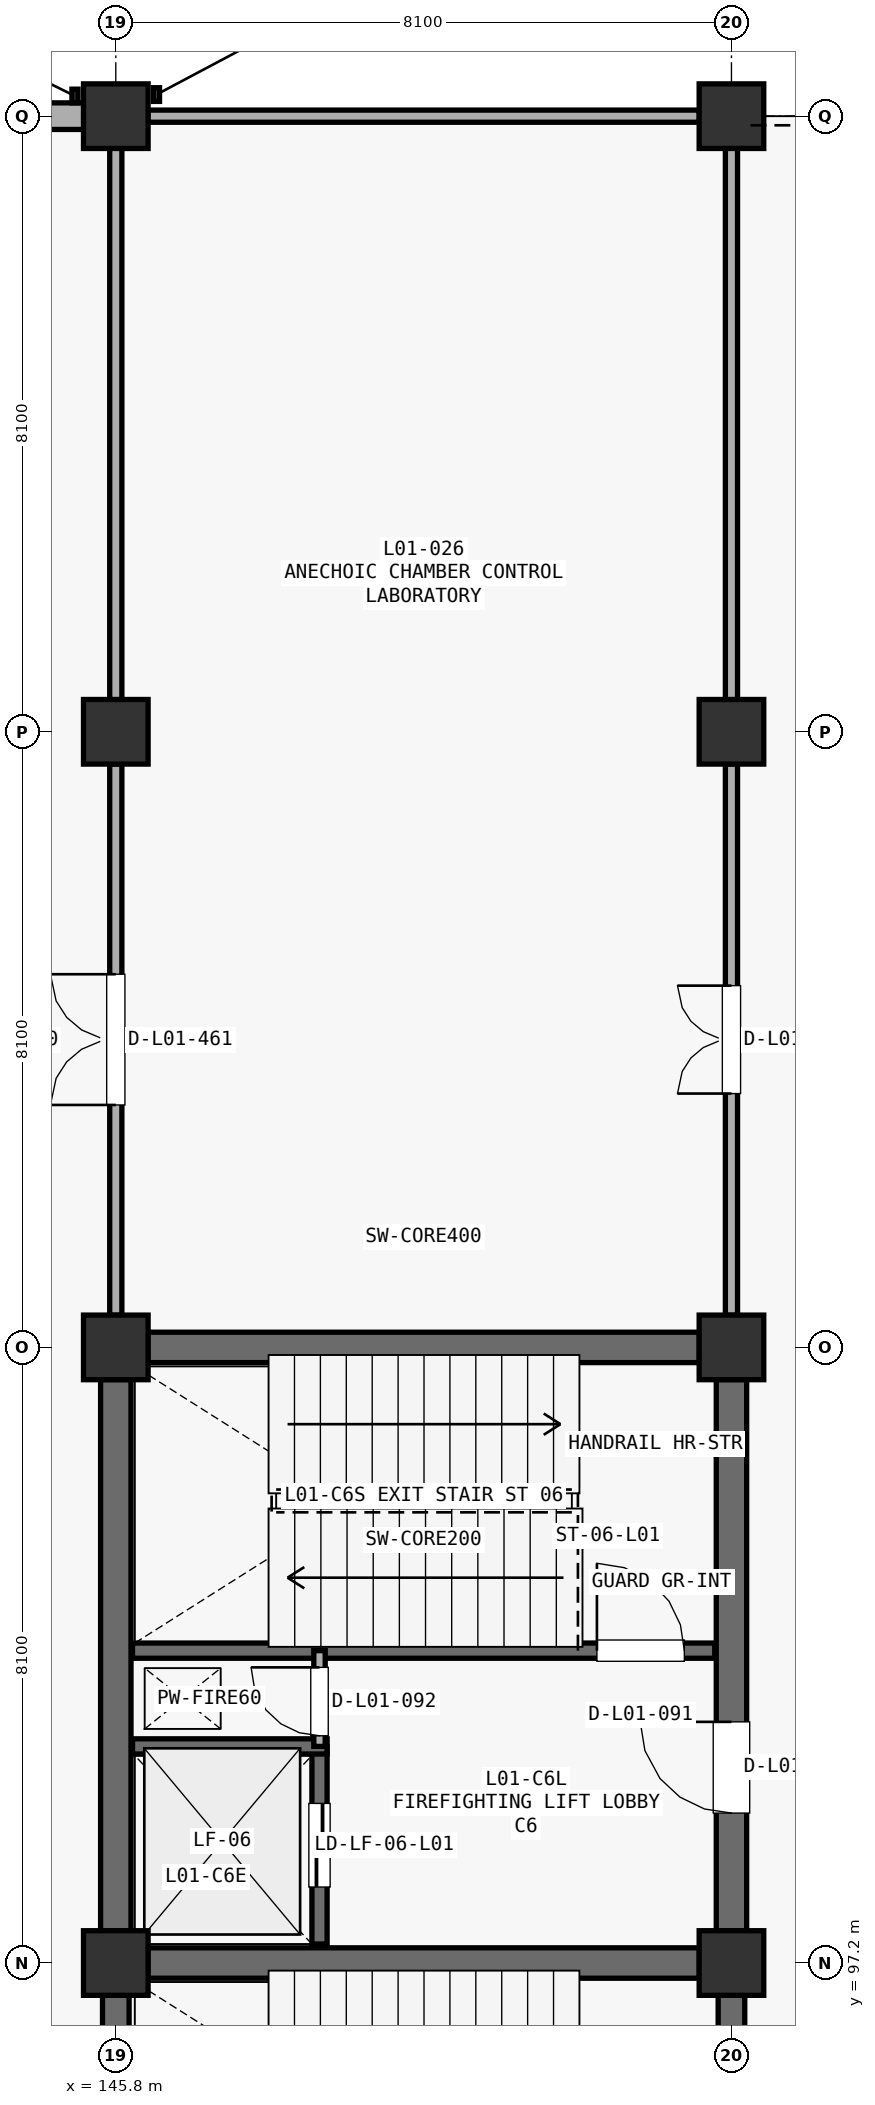
"""IFC4 building model, lengths in metres.
Left out: names, types, materials, properties, quantities, classifications, styles, units other than length and angle.
Written with IfcOpenShell. Run it as: python <this file> out.ifc"""

import sys

from ifc_helpers import new_model, si_unit, direction, frame, frame_2d, origin, origin_2d, place, context, subcontext, project, spatial, rectangle, extrude, element, fill, save


model = new_model("IFC4")
c1 = context("Model", 3, precision=1e-05, world=origin(), true_north=direction((0.0, 1.0)))
c2 = subcontext(c1, "Body", "Model", "MODEL_VIEW")
j1 = project(units=[si_unit("LENGTHUNIT", "METRE"), si_unit("PLANEANGLEUNIT", "RADIAN")], contexts=[c1])
p1 = place(None, origin())
s1 = spatial("IfcSite", under=j1, at=p1, CompositionType="ELEMENT")
p2 = place(p1, origin())
s2 = spatial("IfcBuilding", under=s1, at=p2, CompositionType="ELEMENT")
p3 = place(p2, frame((0.0, 0.0, 5.1)))
s3 = spatial("IfcBuildingStorey", under=s2, at=p3, CompositionType="ELEMENT", Elevation=5.1)
for number, where, z_axis, x_axis in (
    (1, (145.8, 97.2, 0.0), (0.0, 0.0, 1.0), (1.0, 0.0, 0.0)),
    (2, (145.8, 105.3, 0.0), (0.0, 0.0, 1.0), (1.0, 0.0, 0.0)),
    (3, (145.8, 113.4, 0.0), (0.0, 0.0, 1.0), (1.0, 0.0, 0.0)),
    (4, (145.8, 121.5, 0.0), (0.0, 0.0, 1.0), (1.0, 0.0, 0.0)),
    (5, (153.9, 97.2, 0.0), (0.0, 0.0, 1.0), (1.0, 0.0, 0.0)),
    (6, (153.9, 105.3, 0.0), (0.0, 0.0, 1.0), (1.0, 0.0, 0.0)),
    (7, (153.9, 113.4, 0.0), (0.0, 0.0, 1.0), (1.0, 0.0, 0.0)),
    (8, (153.9, 121.5, 0.0), (0.0, 0.0, 1.0), (1.0, 0.0, 0.0)),
):
    element("IfcColumn", number, at=place(p3, frame(where, z_axis=z_axis, x_axis=x_axis)), inside=s3, PredefinedType="COLUMN", context=c2, shape_type="SweptSolid", body=[
        extrude(rectangle(XDim=0.85, YDim=0.85, at=origin_2d()), origin(), (0.0, 0.0, 1.0), 4.59),
    ])
p4 = place(p3, frame((138.123, 121.5, 0.0), z_axis=(0.0, 0.0, 1.0), x_axis=(1.0, 0.0, 0.0)))
e9 = element("IfcWall", 9, at=p4, inside=s3, PredefinedType="STANDARD", context=c2, shape_type="SweptSolid", body=[
    extrude(rectangle(XDim=7.254, YDim=0.35, at=frame_2d((3.627, 0.0))), origin(), (0.0, 0.0, 1.0), 3.362),
])
p5 = place(p4, frame((2.427, 0.0, 0.85)))
e10 = element("IfcOpeningElement", 10, at=p5, cuts=e9, PredefinedType="OPENING", context=c2, shape_type="SweptSolid", body=[
    extrude(rectangle(XDim=2.4, YDim=1.8, at=frame_2d((1.2, 0.9))), frame((0.0, 0.185, 0.0), z_axis=(0.0, -1.0, 0.0), x_axis=(1.0, 0.0, 0.0)), (0.0, 0.0, 1.0), 0.37),
])
p6 = place(p3, frame((146.223, 105.3, 0.0), z_axis=(0.0, 0.0, 1.0), x_axis=(1.0, 0.0, 0.0)))
e11 = element("IfcWall", 11, at=p6, inside=s3, PredefinedType="SHEAR", context=c2, shape_type="SweptSolid", body=[
    extrude(rectangle(XDim=7.254, YDim=0.4, at=frame_2d((3.627, 0.0))), origin(), (0.0, 0.0, 1.0), 4.312),
])
p7 = place(p3, frame((145.8, 97.623, 0.0), z_axis=(0.0, 0.0, 1.0), x_axis=(0.0, 1.0, 0.0)))
e12 = element("IfcWall", 12, at=p7, inside=s3, PredefinedType="SHEAR", context=c2, shape_type="SweptSolid", body=[
    extrude(rectangle(XDim=7.254, YDim=0.4, at=frame_2d((3.627, 0.0))), origin(), (0.0, 0.0, 1.0), 4.312),
])
p8 = place(p3, frame((153.9, 97.623, 0.0), z_axis=(0.0, 0.0, 1.0), x_axis=(0.0, 1.0, 0.0)))
e13 = element("IfcWall", 13, at=p8, inside=s3, PredefinedType="SHEAR", context=c2, shape_type="SweptSolid", body=[
    extrude(rectangle(XDim=7.254, YDim=0.4, at=frame_2d((3.627, 0.0))), origin(), (0.0, 0.0, 1.0), 4.312),
])
p9 = place(p8, frame((1.55, 0.0, 0.0)))
e14 = element("IfcOpeningElement", 14, at=p9, cuts=e13, PredefinedType="OPENING", context=c2, shape_type="SweptSolid", body=[
    extrude(rectangle(XDim=1.2, YDim=2.2, at=frame_2d((0.6, 1.1))), frame((0.0, 0.21, 0.0), z_axis=(0.0, -1.0, 0.0), x_axis=(1.0, 0.0, 0.0)), (0.0, 0.0, 1.0), 0.42),
])
p10 = place(p3, frame((146.223, 97.2, 0.0), z_axis=(0.0, 0.0, 1.0), x_axis=(1.0, 0.0, 0.0)))
e15 = element("IfcWall", 15, at=p10, inside=s3, PredefinedType="SHEAR", context=c2, shape_type="SweptSolid", body=[
    extrude(rectangle(XDim=7.254, YDim=0.4, at=frame_2d((3.627, 0.0))), origin(), (0.0, 0.0, 1.0), 4.312),
])
p11 = place(p3, frame((146.02, 101.31, 0.0), z_axis=(0.0, 0.0, 1.0), x_axis=(1.0, 0.0, 0.0)))
e16 = element("IfcWall", 16, at=p11, inside=s3, PredefinedType="SHEAR", context=c2, shape_type="SweptSolid", body=[
    extrude(rectangle(XDim=7.66, YDim=0.2, at=frame_2d((3.83, 0.0))), origin(), (0.0, 0.0, 1.0), 4.312),
])
p12 = place(p11, frame((6.11, 0.0, 0.0)))
e17 = element("IfcOpeningElement", 17, at=p12, cuts=e16, PredefinedType="OPENING", context=c2, shape_type="SweptSolid", body=[
    extrude(rectangle(XDim=1.15, YDim=2.2, at=frame_2d((0.575, 1.1))), frame((0.0, 0.11, 0.0), z_axis=(0.0, -1.0, 0.0), x_axis=(1.0, 0.0, 0.0)), (0.0, 0.0, 1.0), 0.22),
])
p13 = place(p3, frame((148.48, 97.45, 0.0), z_axis=(0.0, 0.0, 1.0), x_axis=(0.0, 1.0, 0.0)))
e18 = element("IfcWall", 18, at=p13, inside=s3, PredefinedType="SHEAR", context=c2, shape_type="SweptSolid", body=[
    extrude(rectangle(XDim=2.6, YDim=0.2, at=frame_2d((1.3, 0.0))), origin(), (0.0, 0.0, 1.0), 4.312),
])
p14 = place(p13, frame((0.75, 0.0, 0.0)))
e19 = element("IfcOpeningElement", 19, at=p14, cuts=e18, PredefinedType="OPENING", context=c2, shape_type="SweptSolid", body=[
    extrude(rectangle(XDim=1.1, YDim=2.2, at=frame_2d((0.55, 1.1))), frame((0.0, 0.11, 0.0), z_axis=(0.0, -1.0, 0.0), x_axis=(1.0, 0.0, 0.0)), (0.0, 0.0, 1.0), 0.22),
])
p15 = place(p3, frame((146.02, 100.05, 0.0), z_axis=(0.0, 0.0, 1.0), x_axis=(1.0, 0.0, 0.0)))
e20 = element("IfcWall", 20, at=p15, inside=s3, PredefinedType="SHEAR", context=c2, shape_type="SweptSolid", body=[
    extrude(rectangle(XDim=2.56, YDim=0.2, at=frame_2d((1.28, 0.0))), origin(), (0.0, 0.0, 1.0), 4.312),
])
p16 = place(p3, frame((148.48, 100.05, 0.0), z_axis=(0.0, 0.0, 1.0), x_axis=(0.0, 1.0, 0.0)))
e21 = element("IfcWall", 21, at=p16, inside=s3, PredefinedType="PARTITIONING", context=c2, shape_type="SweptSolid", body=[
    extrude(rectangle(XDim=1.26, YDim=0.15, at=frame_2d((0.63, 0.0))), origin(), (0.0, 0.0, 1.0), 4.312),
])
p17 = place(p16, frame((0.14, 0.0, 0.0)))
e22 = element("IfcOpeningElement", 22, at=p17, cuts=e21, PredefinedType="OPENING", context=c2, shape_type="SweptSolid", body=[
    extrude(rectangle(XDim=0.9, YDim=2.15, at=frame_2d((0.45, 1.075))), frame((0.0, 0.085, 0.0), z_axis=(0.0, -1.0, 0.0), x_axis=(1.0, 0.0, 0.0)), (0.0, 0.0, 1.0), 0.17),
])
p18 = place(p3, frame((145.8, 89.523, 0.0), z_axis=(0.0, 0.0, 1.0), x_axis=(0.0, 1.0, 0.0)))
e23 = element("IfcWall", 23, at=p18, inside=s3, PredefinedType="SHEAR", context=c2, shape_type="SweptSolid", body=[
    extrude(rectangle(XDim=7.254, YDim=0.35, at=frame_2d((3.627, 0.0))), origin(), (0.0, 0.0, 1.0), 4.312),
])
p19 = place(p3, frame((153.9, 89.523, 0.0), z_axis=(0.0, 0.0, 1.0), x_axis=(0.0, 1.0, 0.0)))
e24 = element("IfcWall", 24, at=p19, inside=s3, PredefinedType="SHEAR", context=c2, shape_type="SweptSolid", body=[
    extrude(rectangle(XDim=7.254, YDim=0.35, at=frame_2d((3.627, 0.0))), origin(), (0.0, 0.0, 1.0), 4.312),
])
p20 = place(p19, frame((1.55, 0.0, 0.0)))
e25 = element("IfcOpeningElement", 25, at=p20, cuts=e24, PredefinedType="OPENING", context=c2, shape_type="SweptSolid", body=[
    extrude(rectangle(XDim=1.2, YDim=2.2, at=frame_2d((0.6, 1.1))), frame((0.0, 0.185, 0.0), z_axis=(0.0, -1.0, 0.0), x_axis=(1.0, 0.0, 0.0)), (0.0, 0.0, 1.0), 0.37),
])
p21 = place(p3, frame((145.8, 105.723, 0.0), z_axis=(0.0, 0.0, 1.0), x_axis=(0.0, 1.0, 0.0)))
e26 = element("IfcWall", 26, at=p21, inside=s3, PredefinedType="PARTITIONING", context=c2, shape_type="SweptSolid", body=[
    extrude(rectangle(XDim=7.254, YDim=0.16, at=frame_2d((3.627, 0.0))), origin(), (0.0, 0.0, 1.0), 3.662),
])
p22 = place(p21, frame((2.767, 0.0, 0.0)))
e27 = element("IfcOpeningElement", 27, at=p22, cuts=e26, PredefinedType="OPENING", context=c2, shape_type="SweptSolid", body=[
    extrude(rectangle(XDim=1.72, YDim=2.3, at=frame_2d((0.86, 1.15))), frame((0.0, 0.09, 0.0), z_axis=(0.0, -1.0, 0.0), x_axis=(1.0, 0.0, 0.0)), (0.0, 0.0, 1.0), 0.18),
])
p23 = place(p3, frame((145.8, 113.823, 0.0), z_axis=(0.0, 0.0, 1.0), x_axis=(0.0, 1.0, 0.0)))
e28 = element("IfcWall", 28, at=p23, inside=s3, PredefinedType="PARTITIONING", context=c2, shape_type="SweptSolid", body=[
    extrude(rectangle(XDim=7.254, YDim=0.16, at=frame_2d((3.627, 0.0))), origin(), (0.0, 0.0, 1.0), 3.712),
])
p24 = place(p3, frame((153.9, 105.723, 0.0), z_axis=(0.0, 0.0, 1.0), x_axis=(0.0, 1.0, 0.0)))
e29 = element("IfcWall", 29, at=p24, inside=s3, PredefinedType="PARTITIONING", context=c2, shape_type="SweptSolid", body=[
    extrude(rectangle(XDim=7.254, YDim=0.16, at=frame_2d((3.627, 0.0))), origin(), (0.0, 0.0, 1.0), 3.462),
])
p25 = place(p24, frame((2.917, 0.0, 0.0)))
e30 = element("IfcOpeningElement", 30, at=p25, cuts=e29, PredefinedType="OPENING", context=c2, shape_type="SweptSolid", body=[
    extrude(rectangle(XDim=1.42, YDim=2.25, at=frame_2d((0.71, 1.125))), frame((0.0, 0.09, 0.0), z_axis=(0.0, -1.0, 0.0), x_axis=(1.0, 0.0, 0.0)), (0.0, 0.0, 1.0), 0.18),
])
p26 = place(p3, frame((153.9, 113.823, 0.0), z_axis=(0.0, 0.0, 1.0), x_axis=(0.0, 1.0, 0.0)))
e31 = element("IfcWall", 31, at=p26, inside=s3, PredefinedType="PARTITIONING", context=c2, shape_type="SweptSolid", body=[
    extrude(rectangle(XDim=7.254, YDim=0.16, at=frame_2d((3.627, 0.0))), origin(), (0.0, 0.0, 1.0), 3.362),
])
p27 = place(p3, frame((146.223, 121.5, 0.0), z_axis=(0.0, 0.0, 1.0), x_axis=(1.0, 0.0, 0.0)))
e32 = element("IfcWall", 32, at=p27, inside=s3, PredefinedType="PARTITIONING", context=c2, shape_type="SweptSolid", body=[
    extrude(rectangle(XDim=7.254, YDim=0.16, at=frame_2d((3.627, 0.0))), origin(), (0.0, 0.0, 1.0), 3.662),
])
p28 = place(p9, origin())
e33 = element("IfcDoor", 33, at=p28, inside=s3, OperationType="SINGLE_SWING_RIGHT", PredefinedType="DOOR", context=c2, shape_type="SweptSolid", body=[
    extrude(rectangle(XDim=1.2, YDim=2.2, at=frame_2d((0.6, 1.1))), frame((0.0, 0.025, 0.0), z_axis=(0.0, -1.0, 0.0), x_axis=(1.0, 0.0, 0.0)), (0.0, 0.0, 1.0), 0.05),
])
fill(e14, e33)
p29 = place(p12, origin())
e34 = element("IfcDoor", 34, at=p29, inside=s3, OperationType="SINGLE_SWING_LEFT", PredefinedType="DOOR", context=c2, shape_type="SweptSolid", body=[
    extrude(rectangle(XDim=1.15, YDim=2.2, at=frame_2d((0.575, 1.1))), frame((0.0, 0.025, 0.0), z_axis=(0.0, -1.0, 0.0), x_axis=(1.0, 0.0, 0.0)), (0.0, 0.0, 1.0), 0.05),
])
fill(e17, e34)
p30 = place(p14, origin())
e35 = element("IfcDoor", 35, at=p30, inside=s3, OperationType="SLIDING_TO_LEFT", PredefinedType="DOOR", context=c2, shape_type="SweptSolid", body=[
    extrude(rectangle(XDim=1.1, YDim=2.2, at=frame_2d((0.55, 1.1))), frame((0.0, 0.025, 0.0), z_axis=(0.0, -1.0, 0.0), x_axis=(1.0, 0.0, 0.0)), (0.0, 0.0, 1.0), 0.05),
])
fill(e19, e35)
p31 = place(p17, origin())
e36 = element("IfcDoor", 36, at=p31, inside=s3, OperationType="SINGLE_SWING_RIGHT", PredefinedType="DOOR", context=c2, shape_type="SweptSolid", body=[
    extrude(rectangle(XDim=0.9, YDim=2.15, at=frame_2d((0.45, 1.075))), frame((0.0, 0.025, 0.0), z_axis=(0.0, -1.0, 0.0), x_axis=(1.0, 0.0, 0.0)), (0.0, 0.0, 1.0), 0.05),
])
fill(e22, e36)
p32 = place(p22, origin())
e37 = element("IfcDoor", 37, at=p32, inside=s3, OperationType="DOUBLE_SWING_LEFT", PredefinedType="DOOR", context=c2, shape_type="SweptSolid", body=[
    extrude(rectangle(XDim=1.72, YDim=2.3, at=frame_2d((0.86, 1.15))), frame((0.0, 0.025, 0.0), z_axis=(0.0, -1.0, 0.0), x_axis=(1.0, 0.0, 0.0)), (0.0, 0.0, 1.0), 0.05),
])
fill(e27, e37)
p33 = place(p25, origin())
e38 = element("IfcDoor", 38, at=p33, inside=s3, OperationType="DOUBLE_SWING_LEFT", PredefinedType="DOOR", context=c2, shape_type="SweptSolid", body=[
    extrude(rectangle(XDim=1.42, YDim=2.25, at=frame_2d((0.71, 1.125))), frame((0.0, 0.025, 0.0), z_axis=(0.0, -1.0, 0.0), x_axis=(1.0, 0.0, 0.0)), (0.0, 0.0, 1.0), 0.05),
])
fill(e30, e38)
save(model, sys.argv[1])
